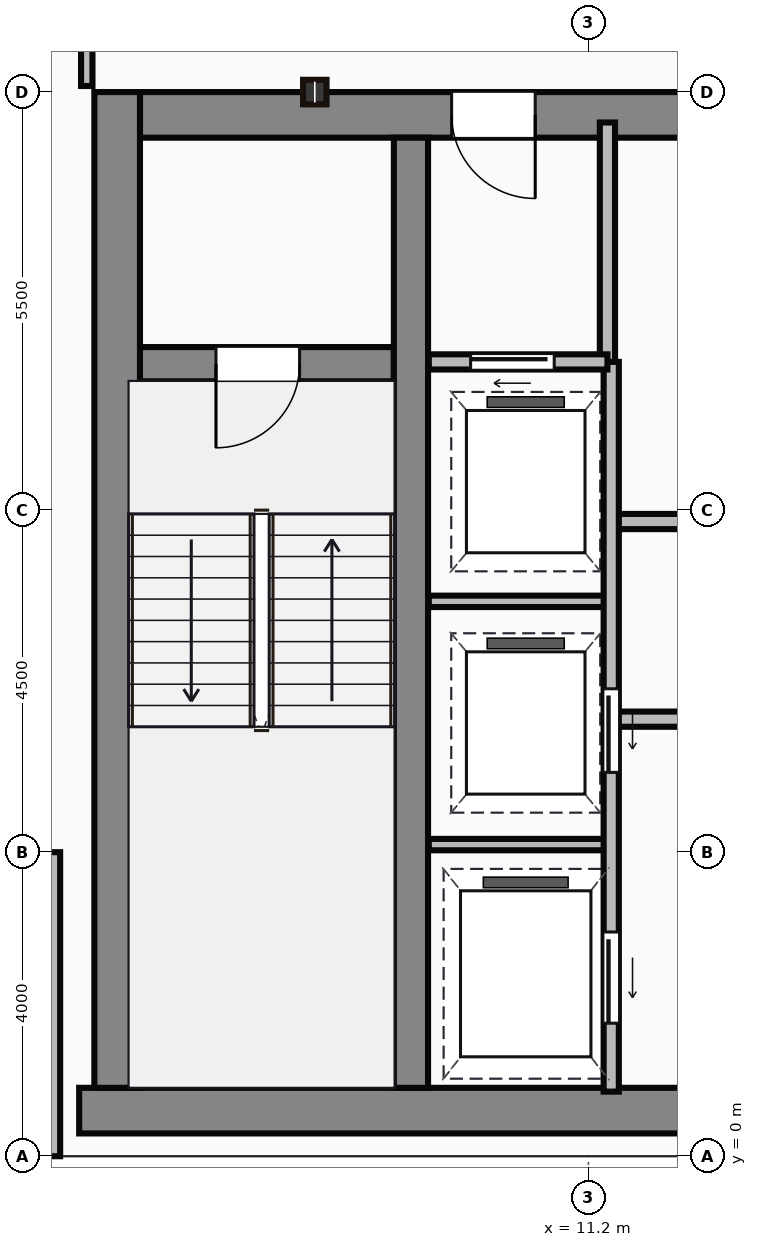
"""IFC4 building model, lengths in metres.
Left out: names, types, materials, properties, quantities, classifications, styles, units other than length and angle.
Written with IfcOpenShell. Run it as: python <this file> out.ifc"""

import sys

from ifc_helpers import new_model, si_unit, direction, frame, frame_2d, origin, origin_2d, place, context, subcontext, project, spatial, rectangle, i_section, extrude, source, transform, mapped, element, fill, save


model = new_model("IFC4")
c1 = context("Model", 3, precision=1e-05, world=origin(), true_north=direction((0.0, 1.0)))
c2 = subcontext(c1, "Body", "Model", "MODEL_VIEW")
j1 = project(units=[si_unit("LENGTHUNIT", "METRE"), si_unit("PLANEANGLEUNIT", "RADIAN")], contexts=[c1])
p1 = place(None, origin())
s1 = spatial("IfcSite", under=j1, at=p1, CompositionType="ELEMENT")
p2 = place(p1, origin())
s2 = spatial("IfcBuilding", under=s1, at=p2, CompositionType="ELEMENT")
p3 = place(p2, frame((0.0, 0.0, 188.6)))
s3 = spatial("IfcBuildingStorey", under=s2, at=p3, CompositionType="ELEMENT", Elevation=188.6)
m1 = source(origin(), c2, "Body", "SweptSolid", [
    extrude(rectangle(XDim=29.5, YDim=0.6, at=frame_2d((14.75, 0.0))), origin(), (0.0, 0.0, 1.0), 3.65),
])
p4 = place(p3, frame((4.5, 0.6, 0.0), z_axis=(0.0, 0.0, 1.0), x_axis=(1.0, 0.0, 0.0)))
e1 = element("IfcWall", 1, at=p4, inside=s3, PredefinedType="SHEAR", context=c2, shape_type="MappedRepresentation", body=[
    mapped(m1, transform((0.0, 0.0, 0.0))),
])
m2 = source(origin(), c2, "Body", "SweptSolid", [
    extrude(rectangle(XDim=13.1, YDim=0.6, at=frame_2d((6.55, 0.0))), origin(), (0.0, 0.0, 1.0), 3.65),
])
p5 = place(p3, frame((5.0, 0.9, 0.0), z_axis=(0.0, 0.0, 1.0), x_axis=(0.0, 1.0, 0.0)))
e2 = element("IfcWall", 2, at=p5, inside=s3, PredefinedType="SHEAR", context=c2, shape_type="MappedRepresentation", body=[
    mapped(m2, transform((0.0, 0.0, 0.0))),
])
m3 = source(origin(), c2, "Body", "SweptSolid", [
    extrude(rectangle(XDim=9.1, YDim=0.6, at=frame_2d((4.55, 0.0))), origin(), (0.0, 0.0, 1.0), 3.65),
])
p6 = place(p3, frame((5.3, 13.7, 0.0), z_axis=(0.0, 0.0, 1.0), x_axis=(1.0, 0.0, 0.0)))
e3 = element("IfcWall", 3, at=p6, inside=s3, PredefinedType="SHEAR", context=c2, shape_type="MappedRepresentation", body=[
    mapped(m3, transform((0.0, 0.0, 0.0))),
])
p7 = place(p6, frame((4.1, 0.0, 0.0)))
e4 = element("IfcOpeningElement", 4, at=p7, cuts=e3, PredefinedType="OPENING", context=c2, shape_type="SweptSolid", body=[
    extrude(rectangle(XDim=1.1, YDim=2.15, at=frame_2d((0.55, 1.075))), frame((0.0, 0.31, 0.0), z_axis=(0.0, -1.0, 0.0), x_axis=(1.0, 0.0, 0.0)), (0.0, 0.0, 1.0), 0.62),
])
m4 = source(origin(), c2, "Body", "SweptSolid", [
    extrude(rectangle(XDim=12.5, YDim=0.45, at=frame_2d((6.25, 0.0))), origin(), (0.0, 0.0, 1.0), 3.65),
])
p8 = place(p3, frame((8.865, 0.9, 0.0), z_axis=(0.0, 0.0, 1.0), x_axis=(0.0, 1.0, 0.0)))
e5 = element("IfcWall", 5, at=p8, inside=s3, PredefinedType="SHEAR", context=c2, shape_type="MappedRepresentation", body=[
    mapped(m4, transform((0.0, 0.0, 0.0))),
])
m5 = source(origin(), c2, "Body", "SweptSolid", [
    extrude(rectangle(XDim=3.39, YDim=0.45, at=frame_2d((1.695, 0.0))), origin(), (0.0, 0.0, 1.0), 3.65),
])
p9 = place(p3, frame((5.25, 10.42, 0.0), z_axis=(0.0, 0.0, 1.0), x_axis=(1.0, 0.0, 0.0)))
e6 = element("IfcWall", 6, at=p9, inside=s3, PredefinedType="SHEAR", context=c2, shape_type="MappedRepresentation", body=[
    mapped(m5, transform((0.0, 0.0, 0.0))),
])
p10 = place(p9, frame((1.05, 0.0, 0.0)))
e7 = element("IfcOpeningElement", 7, at=p10, cuts=e6, PredefinedType="OPENING", context=c2, shape_type="SweptSolid", body=[
    extrude(rectangle(XDim=1.1, YDim=2.15, at=frame_2d((0.55, 1.075))), frame((0.0, 0.235, 0.0), z_axis=(0.0, -1.0, 0.0), x_axis=(1.0, 0.0, 0.0)), (0.0, 0.0, 1.0), 0.47),
])
m6 = source(origin(), c2, "Body", "SweptSolid", [
    extrude(i_section(OverallWidth=0.309, OverallDepth=0.323, WebThickness=0.014, FlangeThickness=0.023, at=origin_2d()), origin(), (0.0, 0.0, 1.0), 3.65),
])
p11 = place(p3, frame((7.6, 14.0, 0.0), z_axis=(0.0, 0.0, 1.0), x_axis=(1.0, 0.0, 0.0)))
e8 = element("IfcColumn", 8, at=p11, inside=s3, PredefinedType="COLUMN", context=c2, shape_type="MappedRepresentation", body=[
    mapped(m6, transform((0.0, 0.0, 0.0))),
])
m7 = source(origin(), c2, "Body", "SweptSolid", [
    extrude(rectangle(XDim=4.0, YDim=0.25, at=frame_2d((2.0, 0.0))), origin(), (0.0, 0.0, 1.0), 3.4),
])
p12 = place(p3, frame((4.125, 4.0, 0.0), z_axis=(0.0, 0.0, 1.0), x_axis=(0.0, -1.0, 0.0)))
e9 = element("IfcWall", 9, at=p12, inside=s3, PredefinedType="STANDARD", context=c2, shape_type="MappedRepresentation", body=[
    mapped(m7, transform((0.0, 0.0, 0.0))),
])
m8 = source(origin(), c2, "Body", "SweptSolid", [
    extrude(rectangle(XDim=3.18, YDim=0.2, at=frame_2d((1.59, 0.0))), origin(), (0.0, 0.0, 1.0), 3.4),
])
p13 = place(p3, frame((11.45, 10.42, 0.0), z_axis=(0.0, 0.0, 1.0), x_axis=(0.0, 1.0, 0.0)))
e10 = element("IfcWall", 10, at=p13, inside=s3, PredefinedType="PARTITIONING", context=c2, shape_type="MappedRepresentation", body=[
    mapped(m8, transform((0.0, 0.0, 0.0))),
])
m9 = source(origin(), c2, "Body", "SweptSolid", [
    extrude(rectangle(XDim=2.35, YDim=0.2, at=frame_2d((1.175, 0.0))), origin(), (0.0, 0.0, 1.0), 3.4),
])
p14 = place(p3, frame((9.1, 10.45, 0.0), z_axis=(0.0, 0.0, 1.0), x_axis=(1.0, 0.0, 0.0)))
e11 = element("IfcWall", 11, at=p14, inside=s3, PredefinedType="PARTITIONING", context=c2, shape_type="MappedRepresentation", body=[
    mapped(m9, transform((0.0, 0.0, 0.0))),
])
p15 = place(p14, frame((0.55, 0.0, 0.0)))
e12 = element("IfcOpeningElement", 12, at=p15, cuts=e11, PredefinedType="OPENING", context=c2, shape_type="SweptSolid", body=[
    extrude(rectangle(XDim=1.1, YDim=2.15, at=frame_2d((0.55, 1.075))), frame((0.0, 0.11, 0.0), z_axis=(0.0, -1.0, 0.0), x_axis=(1.0, 0.0, 0.0)), (0.0, 0.0, 1.0), 0.22),
])
m10 = source(origin(), c2, "Body", "SweptSolid", [
    extrude(rectangle(XDim=9.6, YDim=0.2, at=frame_2d((4.8, 0.0))), origin(), (0.0, 0.0, 1.0), 3.4),
])
p16 = place(p3, frame((11.5, 0.85, 0.0), z_axis=(0.0, 0.0, 1.0), x_axis=(0.0, 1.0, 0.0)))
e13 = element("IfcWall", 13, at=p16, inside=s3, PredefinedType="PARTITIONING", context=c2, shape_type="MappedRepresentation", body=[
    mapped(m10, transform((0.0, 0.0, 0.0))),
])
p17 = place(p16, frame((4.2, 0.0, 0.0)))
e14 = element("IfcOpeningElement", 14, at=p17, cuts=e13, PredefinedType="OPENING", context=c2, shape_type="SweptSolid", body=[
    extrude(rectangle(XDim=1.1, YDim=2.15, at=frame_2d((0.55, 1.075))), frame((0.0, 0.11, 0.0), z_axis=(0.0, -1.0, 0.0), x_axis=(1.0, 0.0, 0.0)), (0.0, 0.0, 1.0), 0.22),
])
p18 = place(p16, frame((0.9, 0.0, 0.0)))
e15 = element("IfcOpeningElement", 15, at=p18, cuts=e13, PredefinedType="OPENING", context=c2, shape_type="SweptSolid", body=[
    extrude(rectangle(XDim=1.2, YDim=2.15, at=frame_2d((0.6, 1.075))), frame((0.0, 0.11, 0.0), z_axis=(0.0, -1.0, 0.0), x_axis=(1.0, 0.0, 0.0)), (0.0, 0.0, 1.0), 0.22),
])
m11 = source(origin(), c2, "Body", "SweptSolid", [
    extrude(rectangle(XDim=2.4, YDim=0.15, at=frame_2d((1.2, 0.0))), origin(), (0.0, 0.0, 1.0), 3.4),
])
for number, where, z_axis, x_axis in (
    (16, (9.1, 4.1, 0.0), (0.0, 0.0, 1.0), (1.0, 0.0, 0.0)),
    (17, (9.1, 7.3, 0.0), (0.0, 0.0, 1.0), (1.0, 0.0, 0.0)),
):
    element("IfcWall", number, at=place(p3, frame(where, z_axis=z_axis, x_axis=x_axis)), inside=s3, PredefinedType="PARTITIONING", context=c2, shape_type="MappedRepresentation", body=[
        mapped(m11, transform((0.0, 0.0, 0.0))),
    ])
m12 = source(origin(), c2, "Body", "SweptSolid", [
    extrude(rectangle(XDim=11.85, YDim=0.2, at=frame_2d((5.925, 0.0))), origin(), (0.0, 0.0, 1.0), 3.4),
])
for number, where, z_axis, x_axis in (
    (18, (11.55, 5.75, 0.0), (0.0, 0.0, 1.0), (1.0, 0.0, 0.0)),
    (19, (11.55, 8.35, 0.0), (0.0, 0.0, 1.0), (1.0, 0.0, 0.0)),
):
    element("IfcWall", number, at=place(p3, frame(where, z_axis=z_axis, x_axis=x_axis)), inside=s3, PredefinedType="PARTITIONING", context=c2, shape_type="MappedRepresentation", body=[
        mapped(m12, transform((0.0, 0.0, 0.0))),
    ])
m13 = source(origin(), c2, "Body", "SweptSolid", [
    extrude(rectangle(XDim=2.12, YDim=0.15, at=frame_2d((1.06, 0.0))), origin(), (0.0, 0.0, 1.0), 3.4),
])
p19 = place(p3, frame((4.6, 14.08, 0.0), z_axis=(0.0, 0.0, 1.0), x_axis=(0.0, 1.0, 0.0)))
e20 = element("IfcWall", 20, at=p19, inside=s3, PredefinedType="PARTITIONING", context=c2, shape_type="MappedRepresentation", body=[
    mapped(m13, transform((0.0, 0.0, 0.0))),
])
m14 = source(origin(), c2, "Body", "SweptSolid", [
    extrude(rectangle(XDim=1.1, YDim=2.15, at=frame_2d((0.55, 1.075))), frame((0.0, 0.025, 0.0), z_axis=(0.0, -1.0, 0.0), x_axis=(1.0, 0.0, 0.0)), (0.0, 0.0, 1.0), 0.05),
])
p20 = place(p10, frame((1.1, 0.0, 0.0), z_axis=(0.0, 0.0, 1.0), x_axis=(-1.0, 0.0, 0.0)))
e21 = element("IfcDoor", 21, at=p20, inside=s3, OperationType="SINGLE_SWING_LEFT", PredefinedType="DOOR", context=c2, shape_type="MappedRepresentation", body=[
    mapped(m14, transform((0.0, 0.0, 0.0))),
])
fill(e7, e21)
p21 = place(p7, origin())
e22 = element("IfcDoor", 22, at=p21, inside=s3, OperationType="SINGLE_SWING_RIGHT", PredefinedType="DOOR", context=c2, shape_type="MappedRepresentation", body=[
    mapped(m14, transform((0.0, 0.0, 0.0))),
])
fill(e4, e22)
p22 = place(p15, origin())
e23 = element("IfcDoor", 23, at=p22, inside=s3, OperationType="SLIDING_TO_LEFT", PredefinedType="DOOR", context=c2, shape_type="MappedRepresentation", body=[
    mapped(m14, transform((0.0, 0.0, 0.0))),
])
fill(e12, e23)
p23 = place(p17, frame((1.1, 0.0, 0.0), z_axis=(0.0, 0.0, 1.0), x_axis=(-1.0, 0.0, 0.0)))
e24 = element("IfcDoor", 24, at=p23, inside=s3, OperationType="SLIDING_TO_LEFT", PredefinedType="DOOR", context=c2, shape_type="MappedRepresentation", body=[
    mapped(m14, transform((0.0, 0.0, 0.0))),
])
fill(e14, e24)
m15 = source(origin(), c2, "Body", "SweptSolid", [
    extrude(rectangle(XDim=1.2, YDim=2.15, at=frame_2d((0.6, 1.075))), frame((0.0, 0.025, 0.0), z_axis=(0.0, -1.0, 0.0), x_axis=(1.0, 0.0, 0.0)), (0.0, 0.0, 1.0), 0.05),
])
p24 = place(p18, frame((1.2, 0.0, 0.0), z_axis=(0.0, 0.0, 1.0), x_axis=(-1.0, 0.0, 0.0)))
e25 = element("IfcDoor", 25, at=p24, inside=s3, OperationType="SLIDING_TO_LEFT", PredefinedType="DOOR", context=c2, shape_type="MappedRepresentation", body=[
    mapped(m15, transform((0.0, 0.0, 0.0))),
])
fill(e15, e25)
save(model, sys.argv[1])
